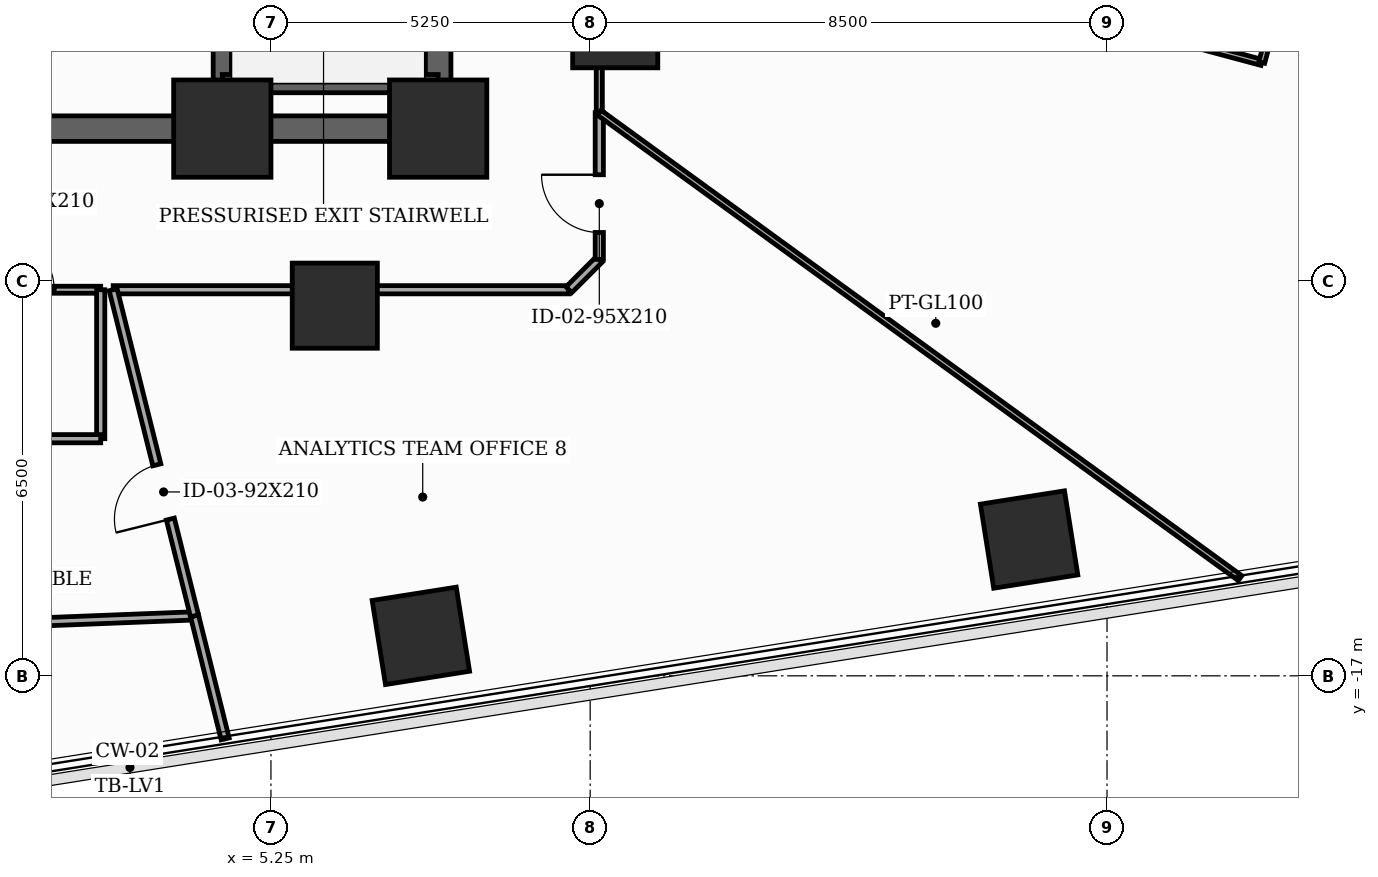
"""IFC4 building model, lengths in metres.
Left out: names, types, materials, properties, quantities, classifications, styles, units other than length and angle.
Written with IfcOpenShell. Run it as: python <this file> out.ifc"""

import sys

from ifc_helpers import new_model, si_unit, direction, frame, frame_2d, origin, origin_2d, place, context, subcontext, project, spatial, rectangle, extrude, element, fill, save


model = new_model("IFC4")
c1 = context("Model", 3, precision=1e-05, world=origin(), true_north=direction((0.0, 1.0)))
c2 = subcontext(c1, "Body", "Model", "MODEL_VIEW")
j1 = project(units=[si_unit("LENGTHUNIT", "METRE"), si_unit("PLANEANGLEUNIT", "RADIAN")], contexts=[c1])
p1 = place(None, origin())
s1 = spatial("IfcSite", under=j1, at=p1, CompositionType="ELEMENT")
p2 = place(p1, origin())
s2 = spatial("IfcBuilding", under=s1, at=p2, CompositionType="ELEMENT")
p3 = place(p2, frame((0.0, 0.0, 59.3)))
s3 = spatial("IfcBuildingStorey", under=s2, at=p3, CompositionType="ELEMENT", Elevation=59.3)
for number, where, z_axis, x_axis in (
    (1, (4.45, -8.0, 0.0), (0.0, 0.0, 1.0), (1.0, 0.0, 0.0)),
    (2, (8.0, -8.0, 0.0), (0.0, 0.0, 1.0), (1.0, 0.0, 0.0)),
):
    element("IfcColumn", number, at=place(p3, frame(where, z_axis=z_axis, x_axis=x_axis)), inside=s3, PredefinedType="COLUMN", context=c2, shape_type="SweptSolid", body=[
        extrude(rectangle(XDim=1.6, YDim=1.6, at=origin_2d()), origin(), (0.0, 0.0, 1.0), 3.7),
    ])
for number, where, z_axis, x_axis in (
    (3, (6.3, -10.912, 0.0), (0.0, 0.0, 1.0), (1.0, 0.0, 0.0)),
    (4, (10.912, -6.3, 0.0), (0.0, 0.0, 1.0), (1.0, 0.0, 0.0)),
    (5, (7.716, -16.343, 0.0), (0.0, 0.0, 1.0), (0.988, 0.156, 0.0)),
    (6, (17.719, -14.758, 0.0), (0.0, 0.0, 1.0), (0.988, 0.156, 0.0)),
):
    element("IfcColumn", number, at=place(p3, frame(where, z_axis=z_axis, x_axis=x_axis)), inside=s3, PredefinedType="COLUMN", context=c2, shape_type="SweptSolid", body=[
        extrude(rectangle(XDim=1.4, YDim=1.4, at=origin_2d()), origin(), (0.0, 0.0, 1.0), 3.7),
    ])
p4 = place(p3, frame((8.0, -8.0, 0.0), z_axis=(0.0, 0.0, 1.0), x_axis=(0.0, 1.0, 0.0)))
e7 = element("IfcWall", 7, at=p4, inside=s3, PredefinedType="SHEAR", context=c2, shape_type="SweptSolid", body=[
    extrude(rectangle(XDim=16.0, YDim=0.42, at=frame_2d((8.0, 0.0))), origin(), (0.0, 0.0, 1.0), 3.5),
])
p5 = place(p4, frame((9.6, 0.0, 0.0)))
e8 = element("IfcOpeningElement", 8, at=p5, cuts=e7, PredefinedType="OPENING", context=c2, shape_type="SweptSolid", body=[
    extrude(rectangle(XDim=1.05, YDim=2.15, at=frame_2d((0.525, 1.075))), frame((0.0, 0.22, 0.0), z_axis=(0.0, -1.0, 0.0), x_axis=(1.0, 0.0, 0.0)), (0.0, 0.0, 1.0), 0.44),
])
p6 = place(p4, frame((14.148, 0.0, 0.0)))
e9 = element("IfcOpeningElement", 9, at=p6, cuts=e7, PredefinedType="OPENING", context=c2, shape_type="SweptSolid", body=[
    extrude(rectangle(XDim=0.85, YDim=2.02, at=frame_2d((0.425, 1.01))), frame((0.0, 0.22, 0.0), z_axis=(0.0, -1.0, 0.0), x_axis=(1.0, 0.0, 0.0)), (0.0, 0.0, 1.0), 0.44),
])
p7 = place(p3, frame((-8.0, -8.0, 0.0), z_axis=(0.0, 0.0, 1.0), x_axis=(1.0, 0.0, 0.0)))
e10 = element("IfcWall", 10, at=p7, inside=s3, PredefinedType="SHEAR", context=c2, shape_type="SweptSolid", body=[
    extrude(rectangle(XDim=16.0, YDim=0.42, at=frame_2d((8.0, 0.0))), origin(), (0.0, 0.0, 1.0), 3.5),
])
p8 = place(p7, frame((7.52, 0.0, 0.0)))
e11 = element("IfcOpeningElement", 11, at=p8, cuts=e10, PredefinedType="OPENING", context=c2, shape_type="SweptSolid", body=[
    extrude(rectangle(XDim=0.95, YDim=2.1, at=frame_2d((0.475, 1.05))), frame((0.0, 0.22, 0.0), z_axis=(0.0, -1.0, 0.0), x_axis=(1.0, 0.0, 0.0)), (0.0, 0.0, 1.0), 0.44),
])
p9 = place(p3, frame((4.45, -7.79, 0.0), z_axis=(0.0, 0.0, 1.0), x_axis=(0.0, 1.0, 0.0)))
e12 = element("IfcWall", 12, at=p9, inside=s3, PredefinedType="SHEAR", context=c2, shape_type="SweptSolid", body=[
    extrude(rectangle(XDim=15.58, YDim=0.3, at=frame_2d((7.79, 0.0))), origin(), (0.0, 0.0, 1.0), 3.5),
])
p10 = place(p3, frame((4.45, -7.26, 0.0), z_axis=(0.0, 0.0, 1.0), x_axis=(1.0, 0.0, 0.0)))
e13 = element("IfcWall", 13, at=p10, inside=s3, PredefinedType="SHEAR", context=c2, shape_type="SweptSolid", body=[
    extrude(rectangle(XDim=3.55, YDim=0.3, at=frame_2d((1.775, 0.0))), origin(), (0.0, 0.0, 1.0), 3.5),
])
p11 = place(p3, frame((10.65, -7.738, 0.0), z_axis=(0.0, 0.0, 1.0), x_axis=(0.0, 1.0, 0.0)))
e14 = element("IfcWall", 14, at=p11, inside=s3, PredefinedType="MOVABLE", context=c2, shape_type="SweptSolid", body=[
    extrude(rectangle(XDim=3.746, YDim=0.1, at=frame_2d((1.873, 0.0))), origin(), (0.0, 0.0, 1.0), 2.785),
])
p12 = place(p3, frame((10.65, -3.992, 0.0), z_axis=(0.0, 0.0, 1.0), x_axis=(0.965906888357, -0.258889712088, 0.0)))
e15 = element("IfcWall", 15, at=p12, inside=s3, PredefinedType="MOVABLE", context=c2, shape_type="SweptSolid", body=[
    extrude(rectangle(XDim=11.28, YDim=0.1, at=frame_2d((5.64, 0.0))), origin(), (0.0, 0.0, 1.0), 2.785),
])
p13 = place(p3, frame((21.545, -6.912, 0.0), z_axis=(0.0, 0.0, 1.0), x_axis=(0.259105843213, 0.965848933329, 0.0)))
e16 = element("IfcWall", 16, at=p13, inside=s3, PredefinedType="MOVABLE", context=c2, shape_type="SweptSolid", body=[
    extrude(rectangle(XDim=2.2, YDim=0.1, at=frame_2d((1.1, 0.0))), origin(), (0.0, 0.0, 1.0), 3.5),
])
p14 = place(p3, frame((0.0, -10.65, 0.0), z_axis=(0.0, 0.0, 1.0), x_axis=(1.0, 0.0, 0.0)))
e17 = element("IfcWall", 17, at=p14, inside=s3, PredefinedType="PARTITIONING", context=c2, shape_type="SweptSolid", body=[
    extrude(rectangle(XDim=2.45, YDim=0.115, at=frame_2d((1.225, 0.0))), origin(), (0.0, 0.0, 1.0), 3.5),
])
p15 = place(p14, frame((0.765, 0.0, 0.0)))
e18 = element("IfcOpeningElement", 18, at=p15, cuts=e17, PredefinedType="OPENING", context=c2, shape_type="SweptSolid", body=[
    extrude(rectangle(XDim=0.92, YDim=2.1, at=frame_2d((0.46, 1.05))), frame((0.0, 0.067, 0.0), z_axis=(0.0, -1.0, 0.0), x_axis=(1.0, 0.0, 0.0)), (0.0, 0.0, 1.0), 0.135),
])
p16 = place(p3, frame((2.655, -10.65, 0.0), z_axis=(0.0, 0.0, 1.0), x_axis=(1.0, 0.0, 0.0)))
e19 = element("IfcWall", 19, at=p16, inside=s3, PredefinedType="PARTITIONING", context=c2, shape_type="SweptSolid", body=[
    extrude(rectangle(XDim=7.495, YDim=0.135, at=frame_2d((3.748, 0.0))), origin(), (0.0, 0.0, 1.0), 2.785),
])
p17 = place(p3, frame((10.15, -10.65, 0.0), z_axis=(0.0, 0.0, 1.0), x_axis=(0.707106781187, 0.707106781187, 0.0)))
e20 = element("IfcWall", 20, at=p17, inside=s3, PredefinedType="PARTITIONING", context=c2, shape_type="SweptSolid", body=[
    extrude(rectangle(XDim=0.707, YDim=0.135, at=frame_2d((0.354, 0.0))), origin(), (0.0, 0.0, 1.0), 3.5),
])
p18 = place(p3, frame((10.65, -10.15, 0.0), z_axis=(0.0, 0.0, 1.0), x_axis=(0.0, 1.0, 0.0)))
e21 = element("IfcWall", 21, at=p18, inside=s3, PredefinedType="PARTITIONING", context=c2, shape_type="SweptSolid", body=[
    extrude(rectangle(XDim=2.412, YDim=0.135, at=frame_2d((1.206, 0.0))), origin(), (0.0, 0.0, 1.0), 3.5),
])
p19 = place(p18, frame((0.442, 0.0, 0.0)))
e22 = element("IfcOpeningElement", 22, at=p19, cuts=e21, PredefinedType="OPENING", context=c2, shape_type="SweptSolid", body=[
    extrude(rectangle(XDim=0.95, YDim=2.1, at=frame_2d((0.475, 1.05))), frame((0.0, 0.077, 0.0), z_axis=(0.0, -1.0, 0.0), x_axis=(1.0, 0.0, 0.0)), (0.0, 0.0, 1.0), 0.155),
])
p20 = place(p3, frame((10.65, -7.738, 0.0), z_axis=(0.0, 0.0, 1.0), x_axis=(0.809048025811, -0.587742538814, 0.0)))
e23 = element("IfcWall", 23, at=p20, inside=s3, PredefinedType="MOVABLE", context=c2, shape_type="SweptSolid", body=[
    extrude(rectangle(XDim=13.025, YDim=0.1, at=frame_2d((6.513, 0.0))), origin(), (0.0, 0.0, 1.0), 2.785),
])
p21 = place(p3, frame((3.993, -16.014, 0.0), z_axis=(0.0, 0.0, 1.0), x_axis=(-0.999230720769, -0.039216918185, 0.0)))
e24 = element("IfcWall", 24, at=p21, inside=s3, PredefinedType="PARTITIONING", context=c2, shape_type="SweptSolid", body=[
    extrude(rectangle(XDim=7.166, YDim=0.135, at=frame_2d((3.583, 0.0))), origin(), (0.0, 0.0, 1.0), 2.785),
])
p22 = place(p3, frame((4.497, -18.037, 0.0), z_axis=(0.0, 0.0, 1.0), x_axis=(-0.24157117672, 0.970383102995, 0.0)))
e25 = element("IfcWall", 25, at=p22, inside=s3, PredefinedType="PARTITIONING", context=c2, shape_type="SweptSolid", body=[
    extrude(rectangle(XDim=2.085, YDim=0.135, at=frame_2d((1.042, 0.0))), origin(), (0.0, 0.0, 1.0), 2.935),
])
p23 = place(p3, frame((2.45, -10.65, 0.0), z_axis=(0.0, 0.0, 1.0), x_axis=(0.0, -1.0, 0.0)))
e26 = element("IfcWall", 26, at=p23, inside=s3, PredefinedType="PARTITIONING", context=c2, shape_type="SweptSolid", body=[
    extrude(rectangle(XDim=2.45, YDim=0.135, at=frame_2d((1.225, 0.0))), origin(), (0.0, 0.0, 1.0), 2.785),
])
p24 = place(p3, frame((2.45, -13.1, 0.0), z_axis=(0.0, 0.0, 1.0), x_axis=(-1.0, 0.0, 0.0)))
e27 = element("IfcWall", 27, at=p24, inside=s3, PredefinedType="PARTITIONING", context=c2, shape_type="SweptSolid", body=[
    extrude(rectangle(XDim=2.45, YDim=0.135, at=frame_2d((1.225, 0.0))), origin(), (0.0, 0.0, 1.0), 2.785),
])
p25 = place(p3, frame((3.993, -16.014, 0.0), z_axis=(0.0, 0.0, 1.0), x_axis=(-0.242005649473, 0.97027484025, 0.0)))
e28 = element("IfcWall", 28, at=p25, inside=s3, PredefinedType="PARTITIONING", context=c2, shape_type="SweptSolid", body=[
    extrude(rectangle(XDim=5.528, YDim=0.135, at=frame_2d((2.764, 0.0))), origin(), (0.0, 0.0, 1.0), 2.785),
])
p26 = place(p25, frame((1.641, 0.0, 0.0)))
e29 = element("IfcOpeningElement", 29, at=p26, cuts=e28, PredefinedType="OPENING", context=c2, shape_type="SweptSolid", body=[
    extrude(rectangle(XDim=0.92, YDim=2.1, at=frame_2d((0.46, 1.05))), frame((0.0, 0.077, 0.0), z_axis=(0.0, -1.0, 0.0), x_axis=(1.0, 0.0, 0.0)), (0.0, 0.0, 1.0), 0.155),
])
p27 = place(p15, origin())
e30 = element("IfcDoor", 30, at=p27, inside=s3, OperationType="SINGLE_SWING_LEFT", PredefinedType="DOOR", context=c2, shape_type="SweptSolid", body=[
    extrude(rectangle(XDim=0.92, YDim=2.1, at=frame_2d((0.46, 1.05))), frame((0.0, 0.025, 0.0), z_axis=(0.0, -1.0, 0.0), x_axis=(1.0, 0.0, 0.0)), (0.0, 0.0, 1.0), 0.05),
])
fill(e18, e30)
p28 = place(p19, origin())
e31 = element("IfcDoor", 31, at=p28, inside=s3, OperationType="SINGLE_SWING_RIGHT", PredefinedType="DOOR", context=c2, shape_type="SweptSolid", body=[
    extrude(rectangle(XDim=0.95, YDim=2.1, at=frame_2d((0.475, 1.05))), frame((0.0, 0.025, 0.0), z_axis=(0.0, -1.0, 0.0), x_axis=(1.0, 0.0, 0.0)), (0.0, 0.0, 1.0), 0.05),
])
fill(e22, e31)
p29 = place(p26, origin())
e32 = element("IfcDoor", 32, at=p29, inside=s3, OperationType="SINGLE_SWING_LEFT", PredefinedType="DOOR", context=c2, shape_type="SweptSolid", body=[
    extrude(rectangle(XDim=0.92, YDim=2.1, at=frame_2d((0.46, 1.05))), frame((0.0, 0.025, 0.0), z_axis=(0.0, -1.0, 0.0), x_axis=(1.0, 0.0, 0.0)), (0.0, 0.0, 1.0), 0.05),
])
fill(e29, e32)
save(model, sys.argv[1])
